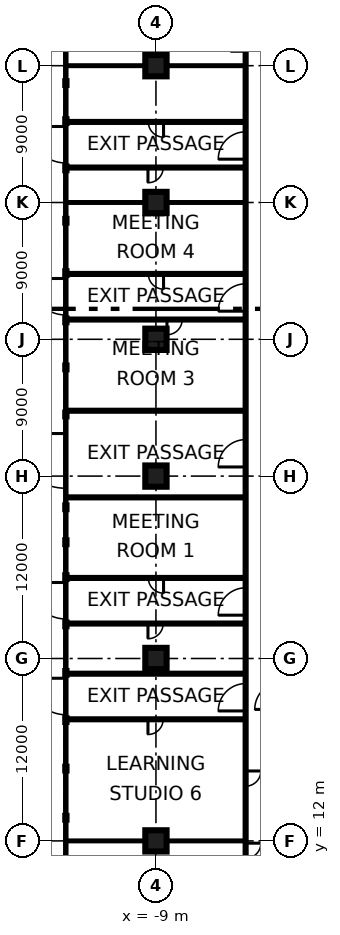
"""IFC4 building model, lengths in metres.
Left out: names, types, materials, properties, quantities, classifications, styles, units other than length and angle.
Written with IfcOpenShell. Run it as: python <this file> out.ifc"""

import sys

from ifc_helpers import new_model, si_unit, direction, frame, frame_2d, origin, origin_2d, place, context, subcontext, project, spatial, rectangle, extrude, element, fill, save


model = new_model("IFC4")
c1 = context("Model", 3, precision=1e-05, world=origin(), true_north=direction((0.0, 1.0)))
c2 = subcontext(c1, "Body", "Model", "MODEL_VIEW")
j1 = project(units=[si_unit("LENGTHUNIT", "METRE"), si_unit("PLANEANGLEUNIT", "RADIAN")], contexts=[c1])
p1 = place(None, origin())
s1 = spatial("IfcSite", under=j1, at=p1, CompositionType="ELEMENT")
p2 = place(p1, origin())
s2 = spatial("IfcBuilding", under=s1, at=p2, CompositionType="ELEMENT")
p3 = place(p2, origin())
s3 = spatial("IfcBuildingStorey", under=s2, at=p3, CompositionType="ELEMENT", Elevation=0.0)
for number, where, z_axis, x_axis in (
    (1, (-9.0, 12.0, 0.0), (0.0, 0.0, 1.0), (1.0, 0.0, 0.0)),
    (2, (-9.0, 24.0, 0.0), (0.0, 0.0, 1.0), (1.0, 0.0, 0.0)),
    (3, (-9.0, 36.0, 0.0), (0.0, 0.0, 1.0), (1.0, 0.0, 0.0)),
    (4, (-9.0, 45.0, 0.0), (0.0, 0.0, 1.0), (1.0, 0.0, 0.0)),
    (5, (-9.0, 54.0, 0.0), (0.0, 0.0, 1.0), (1.0, 0.0, 0.0)),
    (6, (-9.0, 63.0, 0.0), (0.0, 0.0, 1.0), (1.0, 0.0, 0.0)),
):
    element("IfcColumn", number, at=place(p3, frame(where, z_axis=z_axis, x_axis=x_axis)), inside=s3, PredefinedType="COLUMN", context=c2, shape_type="SweptSolid", body=[
        extrude(rectangle(XDim=1.4, YDim=1.4, at=origin_2d()), origin(), (0.0, 0.0, 1.0), 7.2),
    ])
p4 = place(p3, frame((-14.925, 40.0, 0.0), z_axis=(0.0, 0.0, 1.0), x_axis=(0.0, -1.0, 0.0)))
e7 = element("IfcWall", 7, at=p4, inside=s3, PredefinedType="SOLIDWALL", context=c2, shape_type="SweptSolid", body=[
    extrude(rectangle(XDim=6.0, YDim=0.15, at=frame_2d((3.0, 0.0))), origin(), (0.0, 0.0, 1.0), 6.8),
])
p5 = place(p4, frame((1.2, 0.0, 0.0)))
e8 = element("IfcOpeningElement", 8, at=p5, cuts=e7, PredefinedType="OPENING", context=c2, shape_type="SweptSolid", body=[
    extrude(rectangle(XDim=3.6, YDim=2.8, at=frame_2d((1.8, 1.4))), frame((0.0, 0.085, 0.0), z_axis=(0.0, -1.0, 0.0), x_axis=(1.0, 0.0, 0.0)), (0.0, 0.0, 1.0), 0.17),
])
p6 = place(p3, frame((-14.925, 59.3, 0.0), z_axis=(0.0, 0.0, 1.0), x_axis=(0.0, -1.0, 0.0)))
e9 = element("IfcWall", 9, at=p6, inside=s3, PredefinedType="SOLIDWALL", context=c2, shape_type="SweptSolid", body=[
    extrude(rectangle(XDim=3.0, YDim=0.15, at=frame_2d((1.5, 0.0))), origin(), (0.0, 0.0, 1.0), 6.8),
])
p7 = place(p6, frame((0.3, 0.0, 0.0)))
e10 = element("IfcOpeningElement", 10, at=p7, cuts=e9, PredefinedType="OPENING", context=c2, shape_type="SweptSolid", body=[
    extrude(rectangle(XDim=2.4, YDim=2.4, at=frame_2d((1.2, 1.2))), frame((0.0, 0.085, 0.0), z_axis=(0.0, -1.0, 0.0), x_axis=(1.0, 0.0, 0.0)), (0.0, 0.0, 1.0), 0.17),
])
p8 = place(p3, frame((-14.925, 49.3, 0.0), z_axis=(0.0, 0.0, 1.0), x_axis=(0.0, -1.0, 0.0)))
e11 = element("IfcWall", 11, at=p8, inside=s3, PredefinedType="SOLIDWALL", context=c2, shape_type="SweptSolid", body=[
    extrude(rectangle(XDim=3.0, YDim=0.15, at=frame_2d((1.5, 0.0))), origin(), (0.0, 0.0, 1.0), 6.8),
])
p9 = place(p8, frame((0.3, 0.0, 0.0)))
e12 = element("IfcOpeningElement", 12, at=p9, cuts=e11, PredefinedType="OPENING", context=c2, shape_type="SweptSolid", body=[
    extrude(rectangle(XDim=2.4, YDim=2.4, at=frame_2d((1.2, 1.2))), frame((0.0, 0.085, 0.0), z_axis=(0.0, -1.0, 0.0), x_axis=(1.0, 0.0, 0.0)), (0.0, 0.0, 1.0), 0.17),
])
p10 = place(p3, frame((-14.925, 29.3, 0.0), z_axis=(0.0, 0.0, 1.0), x_axis=(0.0, -1.0, 0.0)))
e13 = element("IfcWall", 13, at=p10, inside=s3, PredefinedType="SOLIDWALL", context=c2, shape_type="SweptSolid", body=[
    extrude(rectangle(XDim=3.0, YDim=0.15, at=frame_2d((1.5, 0.0))), origin(), (0.0, 0.0, 1.0), 6.8),
])
p11 = place(p10, frame((0.3, 0.0, 0.0)))
e14 = element("IfcOpeningElement", 14, at=p11, cuts=e13, PredefinedType="OPENING", context=c2, shape_type="SweptSolid", body=[
    extrude(rectangle(XDim=2.4, YDim=2.4, at=frame_2d((1.2, 1.2))), frame((0.0, 0.085, 0.0), z_axis=(0.0, -1.0, 0.0), x_axis=(1.0, 0.0, 0.0)), (0.0, 0.0, 1.0), 0.17),
])
p12 = place(p3, frame((-14.925, 23.0, 0.0), z_axis=(0.0, 0.0, 1.0), x_axis=(0.0, -1.0, 0.0)))
e15 = element("IfcWall", 15, at=p12, inside=s3, PredefinedType="SOLIDWALL", context=c2, shape_type="SweptSolid", body=[
    extrude(rectangle(XDim=3.0, YDim=0.15, at=frame_2d((1.5, 0.0))), origin(), (0.0, 0.0, 1.0), 6.8),
])
p13 = place(p12, frame((0.3, 0.0, 0.0)))
e16 = element("IfcOpeningElement", 16, at=p13, cuts=e15, PredefinedType="OPENING", context=c2, shape_type="SweptSolid", body=[
    extrude(rectangle(XDim=2.4, YDim=2.4, at=frame_2d((1.2, 1.2))), frame((0.0, 0.085, 0.0), z_axis=(0.0, -1.0, 0.0), x_axis=(1.0, 0.0, 0.0)), (0.0, 0.0, 1.0), 0.17),
])
p14 = place(p3, frame((-14.925, 12.0, 0.0), z_axis=(0.0, 0.0, 1.0), x_axis=(1.0, 0.0, 0.0)))
e17 = element("IfcWall", 17, at=p14, inside=s3, PredefinedType="PARTITIONING", context=c2, shape_type="SweptSolid", body=[
    extrude(rectangle(XDim=11.725, YDim=0.125, at=frame_2d((5.863, 0.0))), origin(), (0.0, 0.0, 1.0), 6.8),
])
p15 = place(p3, frame((-14.925, 20.0, 0.0), z_axis=(0.0, 0.0, 1.0), x_axis=(1.0, 0.0, 0.0)))
e18 = element("IfcWall", 18, at=p15, inside=s3, PredefinedType="PARTITIONING", context=c2, shape_type="SweptSolid", body=[
    extrude(rectangle(XDim=11.725, YDim=0.2, at=frame_2d((5.863, 0.0))), origin(), (0.0, 0.0, 1.0), 6.8),
])
p16 = place(p15, frame((5.4, 0.0, 0.0)))
e19 = element("IfcOpeningElement", 19, at=p16, cuts=e18, PredefinedType="OPENING", context=c2, shape_type="SweptSolid", body=[
    extrude(rectangle(XDim=1.0, YDim=2.1, at=frame_2d((0.5, 1.05))), frame((0.0, 0.11, 0.0), z_axis=(0.0, -1.0, 0.0), x_axis=(1.0, 0.0, 0.0)), (0.0, 0.0, 1.0), 0.22),
])
p17 = place(p3, frame((-14.925, 23.0, 0.0), z_axis=(0.0, 0.0, 1.0), x_axis=(1.0, 0.0, 0.0)))
e20 = element("IfcWall", 20, at=p17, inside=s3, PredefinedType="PARTITIONING", context=c2, shape_type="SweptSolid", body=[
    extrude(rectangle(XDim=11.725, YDim=0.2, at=frame_2d((5.863, 0.0))), origin(), (0.0, 0.0, 1.0), 6.8),
])
p18 = place(p3, frame((-14.925, 26.3, 0.0), z_axis=(0.0, 0.0, 1.0), x_axis=(1.0, 0.0, 0.0)))
e21 = element("IfcWall", 21, at=p18, inside=s3, PredefinedType="PARTITIONING", context=c2, shape_type="SweptSolid", body=[
    extrude(rectangle(XDim=11.725, YDim=0.2, at=frame_2d((5.863, 0.0))), origin(), (0.0, 0.0, 1.0), 6.8),
])
p19 = place(p18, frame((5.4, 0.0, 0.0)))
e22 = element("IfcOpeningElement", 22, at=p19, cuts=e21, PredefinedType="OPENING", context=c2, shape_type="SweptSolid", body=[
    extrude(rectangle(XDim=1.0, YDim=2.1, at=frame_2d((0.5, 1.05))), frame((0.0, 0.11, 0.0), z_axis=(0.0, -1.0, 0.0), x_axis=(1.0, 0.0, 0.0)), (0.0, 0.0, 1.0), 0.22),
])
p20 = place(p3, frame((-14.925, 29.3, 0.0), z_axis=(0.0, 0.0, 1.0), x_axis=(1.0, 0.0, 0.0)))
e23 = element("IfcWall", 23, at=p20, inside=s3, PredefinedType="PARTITIONING", context=c2, shape_type="SweptSolid", body=[
    extrude(rectangle(XDim=11.725, YDim=0.2, at=frame_2d((5.863, 0.0))), origin(), (0.0, 0.0, 1.0), 6.8),
])
p21 = place(p20, frame((5.425, 0.0, 0.0)))
e24 = element("IfcOpeningElement", 24, at=p21, cuts=e23, PredefinedType="OPENING", context=c2, shape_type="SweptSolid", body=[
    extrude(rectangle(XDim=1.0, YDim=2.1, at=frame_2d((0.5, 1.05))), frame((0.0, 0.11, 0.0), z_axis=(0.0, -1.0, 0.0), x_axis=(1.0, 0.0, 0.0)), (0.0, 0.0, 1.0), 0.22),
])
p22 = place(p3, frame((-14.925, 40.3, 0.0), z_axis=(0.0, 0.0, 1.0), x_axis=(1.0, 0.0, 0.0)))
e25 = element("IfcWall", 25, at=p22, inside=s3, PredefinedType="PARTITIONING", context=c2, shape_type="SweptSolid", body=[
    extrude(rectangle(XDim=11.725, YDim=0.2, at=frame_2d((5.863, 0.0))), origin(), (0.0, 0.0, 1.0), 6.8),
])
p23 = place(p3, frame((-14.925, 46.3, 0.0), z_axis=(0.0, 0.0, 1.0), x_axis=(1.0, 0.0, 0.0)))
e26 = element("IfcWall", 26, at=p23, inside=s3, PredefinedType="PARTITIONING", context=c2, shape_type="SweptSolid", body=[
    extrude(rectangle(XDim=11.725, YDim=0.2, at=frame_2d((5.863, 0.0))), origin(), (0.0, 0.0, 1.0), 6.8),
])
p24 = place(p23, frame((6.65, 0.0, 0.0)))
e27 = element("IfcOpeningElement", 27, at=p24, cuts=e26, PredefinedType="OPENING", context=c2, shape_type="SweptSolid", body=[
    extrude(rectangle(XDim=1.0, YDim=2.1, at=frame_2d((0.5, 1.05))), frame((0.0, 0.11, 0.0), z_axis=(0.0, -1.0, 0.0), x_axis=(1.0, 0.0, 0.0)), (0.0, 0.0, 1.0), 0.22),
])
p25 = place(p3, frame((-14.925, 49.3, 0.0), z_axis=(0.0, 0.0, 1.0), x_axis=(1.0, 0.0, 0.0)))
e28 = element("IfcWall", 28, at=p25, inside=s3, PredefinedType="PARTITIONING", context=c2, shape_type="SweptSolid", body=[
    extrude(rectangle(XDim=11.725, YDim=0.2, at=frame_2d((5.863, 0.0))), origin(), (0.0, 0.0, 1.0), 6.8),
])
p26 = place(p25, frame((5.425, 0.0, 0.0)))
e29 = element("IfcOpeningElement", 29, at=p26, cuts=e28, PredefinedType="OPENING", context=c2, shape_type="SweptSolid", body=[
    extrude(rectangle(XDim=1.0, YDim=2.1, at=frame_2d((0.5, 1.05))), frame((0.0, 0.11, 0.0), z_axis=(0.0, -1.0, 0.0), x_axis=(1.0, 0.0, 0.0)), (0.0, 0.0, 1.0), 0.22),
])
p27 = place(p3, frame((-14.925, 54.0, 0.0), z_axis=(0.0, 0.0, 1.0), x_axis=(1.0, 0.0, 0.0)))
e30 = element("IfcWall", 30, at=p27, inside=s3, PredefinedType="PARTITIONING", context=c2, shape_type="SweptSolid", body=[
    extrude(rectangle(XDim=11.725, YDim=0.125, at=frame_2d((5.863, 0.0))), origin(), (0.0, 0.0, 1.0), 6.8),
])
p28 = place(p3, frame((-14.925, 56.3, 0.0), z_axis=(0.0, 0.0, 1.0), x_axis=(1.0, 0.0, 0.0)))
e31 = element("IfcWall", 31, at=p28, inside=s3, PredefinedType="PARTITIONING", context=c2, shape_type="SweptSolid", body=[
    extrude(rectangle(XDim=11.725, YDim=0.2, at=frame_2d((5.863, 0.0))), origin(), (0.0, 0.0, 1.0), 6.8),
])
p29 = place(p28, frame((5.4, 0.0, 0.0)))
e32 = element("IfcOpeningElement", 32, at=p29, cuts=e31, PredefinedType="OPENING", context=c2, shape_type="SweptSolid", body=[
    extrude(rectangle(XDim=1.0, YDim=2.1, at=frame_2d((0.5, 1.05))), frame((0.0, 0.11, 0.0), z_axis=(0.0, -1.0, 0.0), x_axis=(1.0, 0.0, 0.0)), (0.0, 0.0, 1.0), 0.22),
])
p30 = place(p3, frame((-14.925, 59.3, 0.0), z_axis=(0.0, 0.0, 1.0), x_axis=(1.0, 0.0, 0.0)))
e33 = element("IfcWall", 33, at=p30, inside=s3, PredefinedType="PARTITIONING", context=c2, shape_type="SweptSolid", body=[
    extrude(rectangle(XDim=11.725, YDim=0.2, at=frame_2d((5.863, 0.0))), origin(), (0.0, 0.0, 1.0), 6.8),
])
p31 = place(p30, frame((5.425, 0.0, 0.0)))
e34 = element("IfcOpeningElement", 34, at=p31, cuts=e33, PredefinedType="OPENING", context=c2, shape_type="SweptSolid", body=[
    extrude(rectangle(XDim=1.0, YDim=2.1, at=frame_2d((0.5, 1.05))), frame((0.0, 0.11, 0.0), z_axis=(0.0, -1.0, 0.0), x_axis=(1.0, 0.0, 0.0)), (0.0, 0.0, 1.0), 0.22),
])
p32 = place(p3, frame((-14.925, 63.0, 0.0), z_axis=(0.0, 0.0, 1.0), x_axis=(1.0, 0.0, 0.0)))
e35 = element("IfcWall", 35, at=p32, inside=s3, PredefinedType="PARTITIONING", context=c2, shape_type="SweptSolid", body=[
    extrude(rectangle(XDim=11.725, YDim=0.125, at=frame_2d((5.863, 0.0))), origin(), (0.0, 0.0, 1.0), 6.8),
])
p33 = place(p3, frame((-14.851, 34.6, 0.0), z_axis=(0.0, 0.0, 1.0), x_axis=(1.0, 0.0, 0.0)))
e36 = element("IfcWall", 36, at=p33, inside=s3, PredefinedType="PARTITIONING", context=c2, shape_type="SweptSolid", body=[
    extrude(rectangle(XDim=11.651, YDim=0.2, at=frame_2d((5.826, 0.0))), origin(), (0.0, 0.0, 1.0), 6.8),
])
p34 = place(p3, frame((-3.1, -3.0, 0.0), z_axis=(0.0, 0.0, 1.0), x_axis=(0.0, 1.0, 0.0)))
e37 = element("IfcWall", 37, at=p34, inside=s3, PredefinedType="PARTITIONING", context=c2, shape_type="SweptSolid", body=[
    extrude(rectangle(XDim=69.1, YDim=0.2, at=frame_2d((34.55, 0.0))), origin(), (0.0, 0.0, 1.0), 6.8),
])
p35 = place(p34, frame((8.6, 0.0, 0.0)))
e38 = element("IfcOpeningElement", 38, at=p35, cuts=e37, PredefinedType="OPENING", context=c2, shape_type="SweptSolid", body=[
    extrude(rectangle(XDim=1.0, YDim=2.1, at=frame_2d((0.5, 1.05))), frame((0.0, 0.11, 0.0), z_axis=(0.0, -1.0, 0.0), x_axis=(1.0, 0.0, 0.0)), (0.0, 0.0, 1.0), 0.22),
])
p36 = place(p34, frame((13.85, 0.0, 0.0)))
e39 = element("IfcOpeningElement", 39, at=p36, cuts=e37, PredefinedType="OPENING", context=c2, shape_type="SweptSolid", body=[
    extrude(rectangle(XDim=1.0, YDim=2.1, at=frame_2d((0.5, 1.05))), frame((0.0, 0.11, 0.0), z_axis=(0.0, -1.0, 0.0), x_axis=(1.0, 0.0, 0.0)), (0.0, 0.0, 1.0), 0.22),
])
p37 = place(p34, frame((18.6, 0.0, 0.0)))
e40 = element("IfcOpeningElement", 40, at=p37, cuts=e37, PredefinedType="OPENING", context=c2, shape_type="SweptSolid", body=[
    extrude(rectangle(XDim=1.0, YDim=2.1, at=frame_2d((0.5, 1.05))), frame((0.0, 0.11, 0.0), z_axis=(0.0, -1.0, 0.0), x_axis=(1.0, 0.0, 0.0)), (0.0, 0.0, 1.0), 0.22),
])
p38 = place(p34, frame((66.95, 0.0, 0.0)))
e41 = element("IfcOpeningElement", 41, at=p38, cuts=e37, PredefinedType="OPENING", context=c2, shape_type="SweptSolid", body=[
    extrude(rectangle(XDim=1.0, YDim=2.1, at=frame_2d((0.5, 1.05))), frame((0.0, 0.11, 0.0), z_axis=(0.0, -1.0, 0.0), x_axis=(1.0, 0.0, 0.0)), (0.0, 0.0, 1.0), 0.22),
])
p39 = place(p34, frame((59.85, 0.0, 0.0)))
e42 = element("IfcOpeningElement", 42, at=p39, cuts=e37, PredefinedType="OPENING", context=c2, shape_type="SweptSolid", body=[
    extrude(rectangle(XDim=1.8, YDim=2.1, at=frame_2d((0.9, 1.05))), frame((0.0, 0.11, 0.0), z_axis=(0.0, -1.0, 0.0), x_axis=(1.0, 0.0, 0.0)), (0.0, 0.0, 1.0), 0.22),
])
p40 = place(p34, frame((49.85, 0.0, 0.0)))
e43 = element("IfcOpeningElement", 43, at=p40, cuts=e37, PredefinedType="OPENING", context=c2, shape_type="SweptSolid", body=[
    extrude(rectangle(XDim=1.8, YDim=2.1, at=frame_2d((0.9, 1.05))), frame((0.0, 0.11, 0.0), z_axis=(0.0, -1.0, 0.0), x_axis=(1.0, 0.0, 0.0)), (0.0, 0.0, 1.0), 0.22),
])
p41 = place(p34, frame((29.85, 0.0, 0.0)))
e44 = element("IfcOpeningElement", 44, at=p41, cuts=e37, PredefinedType="OPENING", context=c2, shape_type="SweptSolid", body=[
    extrude(rectangle(XDim=1.8, YDim=2.1, at=frame_2d((0.9, 1.05))), frame((0.0, 0.11, 0.0), z_axis=(0.0, -1.0, 0.0), x_axis=(1.0, 0.0, 0.0)), (0.0, 0.0, 1.0), 0.22),
])
p42 = place(p34, frame((39.6, 0.0, 0.0)))
e45 = element("IfcOpeningElement", 45, at=p42, cuts=e37, PredefinedType="OPENING", context=c2, shape_type="SweptSolid", body=[
    extrude(rectangle(XDim=1.8, YDim=2.1, at=frame_2d((0.9, 1.05))), frame((0.0, 0.11, 0.0), z_axis=(0.0, -1.0, 0.0), x_axis=(1.0, 0.0, 0.0)), (0.0, 0.0, 1.0), 0.22),
])
p43 = place(p34, frame((23.55, 0.0, 0.0)))
e46 = element("IfcOpeningElement", 46, at=p43, cuts=e37, PredefinedType="OPENING", context=c2, shape_type="SweptSolid", body=[
    extrude(rectangle(XDim=1.8, YDim=2.1, at=frame_2d((0.9, 1.05))), frame((0.0, 0.11, 0.0), z_axis=(0.0, -1.0, 0.0), x_axis=(1.0, 0.0, 0.0)), (0.0, 0.0, 1.0), 0.22),
])
p44 = place(p5, frame((3.6, 0.0, 0.0), z_axis=(0.0, 0.0, 1.0), x_axis=(-1.0, 0.0, 0.0)))
e47 = element("IfcDoor", 47, at=p44, inside=s3, OperationType="DOUBLE_DOOR_SINGLE_SWING", PredefinedType="DOOR", context=c2, shape_type="SweptSolid", body=[
    extrude(rectangle(XDim=3.6, YDim=2.8, at=frame_2d((1.8, 1.4))), frame((0.0, 0.025, 0.0), z_axis=(0.0, -1.0, 0.0), x_axis=(1.0, 0.0, 0.0)), (0.0, 0.0, 1.0), 0.05),
])
fill(e8, e47)
p45 = place(p7, frame((2.4, 0.0, 0.0), z_axis=(0.0, 0.0, 1.0), x_axis=(-1.0, 0.0, 0.0)))
e48 = element("IfcDoor", 48, at=p45, inside=s3, OperationType="DOUBLE_DOOR_SINGLE_SWING", PredefinedType="DOOR", context=c2, shape_type="SweptSolid", body=[
    extrude(rectangle(XDim=2.4, YDim=2.4, at=frame_2d((1.2, 1.2))), frame((0.0, 0.025, 0.0), z_axis=(0.0, -1.0, 0.0), x_axis=(1.0, 0.0, 0.0)), (0.0, 0.0, 1.0), 0.05),
])
fill(e10, e48)
p46 = place(p9, frame((2.4, 0.0, 0.0), z_axis=(0.0, 0.0, 1.0), x_axis=(-1.0, 0.0, 0.0)))
e49 = element("IfcDoor", 49, at=p46, inside=s3, OperationType="DOUBLE_DOOR_SINGLE_SWING", PredefinedType="DOOR", context=c2, shape_type="SweptSolid", body=[
    extrude(rectangle(XDim=2.4, YDim=2.4, at=frame_2d((1.2, 1.2))), frame((0.0, 0.025, 0.0), z_axis=(0.0, -1.0, 0.0), x_axis=(1.0, 0.0, 0.0)), (0.0, 0.0, 1.0), 0.05),
])
fill(e12, e49)
p47 = place(p11, frame((2.4, 0.0, 0.0), z_axis=(0.0, 0.0, 1.0), x_axis=(-1.0, 0.0, 0.0)))
e50 = element("IfcDoor", 50, at=p47, inside=s3, OperationType="DOUBLE_DOOR_SINGLE_SWING", PredefinedType="DOOR", context=c2, shape_type="SweptSolid", body=[
    extrude(rectangle(XDim=2.4, YDim=2.4, at=frame_2d((1.2, 1.2))), frame((0.0, 0.025, 0.0), z_axis=(0.0, -1.0, 0.0), x_axis=(1.0, 0.0, 0.0)), (0.0, 0.0, 1.0), 0.05),
])
fill(e14, e50)
p48 = place(p13, frame((2.4, 0.0, 0.0), z_axis=(0.0, 0.0, 1.0), x_axis=(-1.0, 0.0, 0.0)))
e51 = element("IfcDoor", 51, at=p48, inside=s3, OperationType="DOUBLE_DOOR_SINGLE_SWING", PredefinedType="DOOR", context=c2, shape_type="SweptSolid", body=[
    extrude(rectangle(XDim=2.4, YDim=2.4, at=frame_2d((1.2, 1.2))), frame((0.0, 0.025, 0.0), z_axis=(0.0, -1.0, 0.0), x_axis=(1.0, 0.0, 0.0)), (0.0, 0.0, 1.0), 0.05),
])
fill(e16, e51)
p49 = place(p36, origin())
e52 = element("IfcDoor", 52, at=p49, inside=s3, OperationType="SINGLE_SWING_RIGHT", PredefinedType="DOOR", context=c2, shape_type="SweptSolid", body=[
    extrude(rectangle(XDim=1.0, YDim=2.1, at=frame_2d((0.5, 1.05))), frame((0.0, 0.025, 0.0), z_axis=(0.0, -1.0, 0.0), x_axis=(1.0, 0.0, 0.0)), (0.0, 0.0, 1.0), 0.05),
])
fill(e39, e52)
p50 = place(p16, frame((1.0, 0.0, 0.0), z_axis=(0.0, 0.0, 1.0), x_axis=(-1.0, 0.0, 0.0)))
e53 = element("IfcDoor", 53, at=p50, inside=s3, OperationType="SINGLE_SWING_LEFT", PredefinedType="DOOR", context=c2, shape_type="SweptSolid", body=[
    extrude(rectangle(XDim=1.0, YDim=2.1, at=frame_2d((0.5, 1.05))), frame((0.0, 0.025, 0.0), z_axis=(0.0, -1.0, 0.0), x_axis=(1.0, 0.0, 0.0)), (0.0, 0.0, 1.0), 0.05),
])
fill(e19, e53)
p51 = place(p37, origin())
e54 = element("IfcDoor", 54, at=p51, inside=s3, OperationType="SINGLE_SWING_RIGHT", PredefinedType="DOOR", context=c2, shape_type="SweptSolid", body=[
    extrude(rectangle(XDim=1.0, YDim=2.1, at=frame_2d((0.5, 1.05))), frame((0.0, 0.025, 0.0), z_axis=(0.0, -1.0, 0.0), x_axis=(1.0, 0.0, 0.0)), (0.0, 0.0, 1.0), 0.05),
])
fill(e40, e54)
p52 = place(p19, frame((1.0, 0.0, 0.0), z_axis=(0.0, 0.0, 1.0), x_axis=(-1.0, 0.0, 0.0)))
e55 = element("IfcDoor", 55, at=p52, inside=s3, OperationType="SINGLE_SWING_LEFT", PredefinedType="DOOR", context=c2, shape_type="SweptSolid", body=[
    extrude(rectangle(XDim=1.0, YDim=2.1, at=frame_2d((0.5, 1.05))), frame((0.0, 0.025, 0.0), z_axis=(0.0, -1.0, 0.0), x_axis=(1.0, 0.0, 0.0)), (0.0, 0.0, 1.0), 0.05),
])
fill(e22, e55)
p53 = place(p21, origin())
e56 = element("IfcDoor", 56, at=p53, inside=s3, OperationType="SINGLE_SWING_RIGHT", PredefinedType="DOOR", context=c2, shape_type="SweptSolid", body=[
    extrude(rectangle(XDim=1.0, YDim=2.1, at=frame_2d((0.5, 1.05))), frame((0.0, 0.025, 0.0), z_axis=(0.0, -1.0, 0.0), x_axis=(1.0, 0.0, 0.0)), (0.0, 0.0, 1.0), 0.05),
])
fill(e24, e56)
p54 = place(p24, frame((1.0, 0.0, 0.0), z_axis=(0.0, 0.0, 1.0), x_axis=(-1.0, 0.0, 0.0)))
e57 = element("IfcDoor", 57, at=p54, inside=s3, OperationType="SINGLE_SWING_LEFT", PredefinedType="DOOR", context=c2, shape_type="SweptSolid", body=[
    extrude(rectangle(XDim=1.0, YDim=2.1, at=frame_2d((0.5, 1.05))), frame((0.0, 0.025, 0.0), z_axis=(0.0, -1.0, 0.0), x_axis=(1.0, 0.0, 0.0)), (0.0, 0.0, 1.0), 0.05),
])
fill(e27, e57)
p55 = place(p26, origin())
e58 = element("IfcDoor", 58, at=p55, inside=s3, OperationType="SINGLE_SWING_RIGHT", PredefinedType="DOOR", context=c2, shape_type="SweptSolid", body=[
    extrude(rectangle(XDim=1.0, YDim=2.1, at=frame_2d((0.5, 1.05))), frame((0.0, 0.025, 0.0), z_axis=(0.0, -1.0, 0.0), x_axis=(1.0, 0.0, 0.0)), (0.0, 0.0, 1.0), 0.05),
])
fill(e29, e58)
p56 = place(p29, frame((1.0, 0.0, 0.0), z_axis=(0.0, 0.0, 1.0), x_axis=(-1.0, 0.0, 0.0)))
e59 = element("IfcDoor", 59, at=p56, inside=s3, OperationType="SINGLE_SWING_LEFT", PredefinedType="DOOR", context=c2, shape_type="SweptSolid", body=[
    extrude(rectangle(XDim=1.0, YDim=2.1, at=frame_2d((0.5, 1.05))), frame((0.0, 0.025, 0.0), z_axis=(0.0, -1.0, 0.0), x_axis=(1.0, 0.0, 0.0)), (0.0, 0.0, 1.0), 0.05),
])
fill(e32, e59)
p57 = place(p31, origin())
e60 = element("IfcDoor", 60, at=p57, inside=s3, OperationType="SINGLE_SWING_RIGHT", PredefinedType="DOOR", context=c2, shape_type="SweptSolid", body=[
    extrude(rectangle(XDim=1.0, YDim=2.1, at=frame_2d((0.5, 1.05))), frame((0.0, 0.025, 0.0), z_axis=(0.0, -1.0, 0.0), x_axis=(1.0, 0.0, 0.0)), (0.0, 0.0, 1.0), 0.05),
])
fill(e34, e60)
p58 = place(p39, origin())
e61 = element("IfcDoor", 61, at=p58, inside=s3, OperationType="DOUBLE_DOOR_SINGLE_SWING", PredefinedType="DOOR", context=c2, shape_type="SweptSolid", body=[
    extrude(rectangle(XDim=1.8, YDim=2.1, at=frame_2d((0.9, 1.05))), frame((0.0, 0.025, 0.0), z_axis=(0.0, -1.0, 0.0), x_axis=(1.0, 0.0, 0.0)), (0.0, 0.0, 1.0), 0.05),
])
fill(e42, e61)
p59 = place(p40, origin())
e62 = element("IfcDoor", 62, at=p59, inside=s3, OperationType="DOUBLE_DOOR_SINGLE_SWING", PredefinedType="DOOR", context=c2, shape_type="SweptSolid", body=[
    extrude(rectangle(XDim=1.8, YDim=2.1, at=frame_2d((0.9, 1.05))), frame((0.0, 0.025, 0.0), z_axis=(0.0, -1.0, 0.0), x_axis=(1.0, 0.0, 0.0)), (0.0, 0.0, 1.0), 0.05),
])
fill(e43, e62)
p60 = place(p41, origin())
e63 = element("IfcDoor", 63, at=p60, inside=s3, OperationType="DOUBLE_DOOR_SINGLE_SWING", PredefinedType="DOOR", context=c2, shape_type="SweptSolid", body=[
    extrude(rectangle(XDim=1.8, YDim=2.1, at=frame_2d((0.9, 1.05))), frame((0.0, 0.025, 0.0), z_axis=(0.0, -1.0, 0.0), x_axis=(1.0, 0.0, 0.0)), (0.0, 0.0, 1.0), 0.05),
])
fill(e44, e63)
p61 = place(p42, origin())
e64 = element("IfcDoor", 64, at=p61, inside=s3, OperationType="DOUBLE_DOOR_SINGLE_SWING", PredefinedType="DOOR", context=c2, shape_type="SweptSolid", body=[
    extrude(rectangle(XDim=1.8, YDim=2.1, at=frame_2d((0.9, 1.05))), frame((0.0, 0.025, 0.0), z_axis=(0.0, -1.0, 0.0), x_axis=(1.0, 0.0, 0.0)), (0.0, 0.0, 1.0), 0.05),
])
fill(e45, e64)
p62 = place(p43, origin())
e65 = element("IfcDoor", 65, at=p62, inside=s3, OperationType="DOUBLE_DOOR_SINGLE_SWING", PredefinedType="DOOR", context=c2, shape_type="SweptSolid", body=[
    extrude(rectangle(XDim=1.8, YDim=2.1, at=frame_2d((0.9, 1.05))), frame((0.0, 0.025, 0.0), z_axis=(0.0, -1.0, 0.0), x_axis=(1.0, 0.0, 0.0)), (0.0, 0.0, 1.0), 0.05),
])
fill(e46, e65)
save(model, sys.argv[1])
